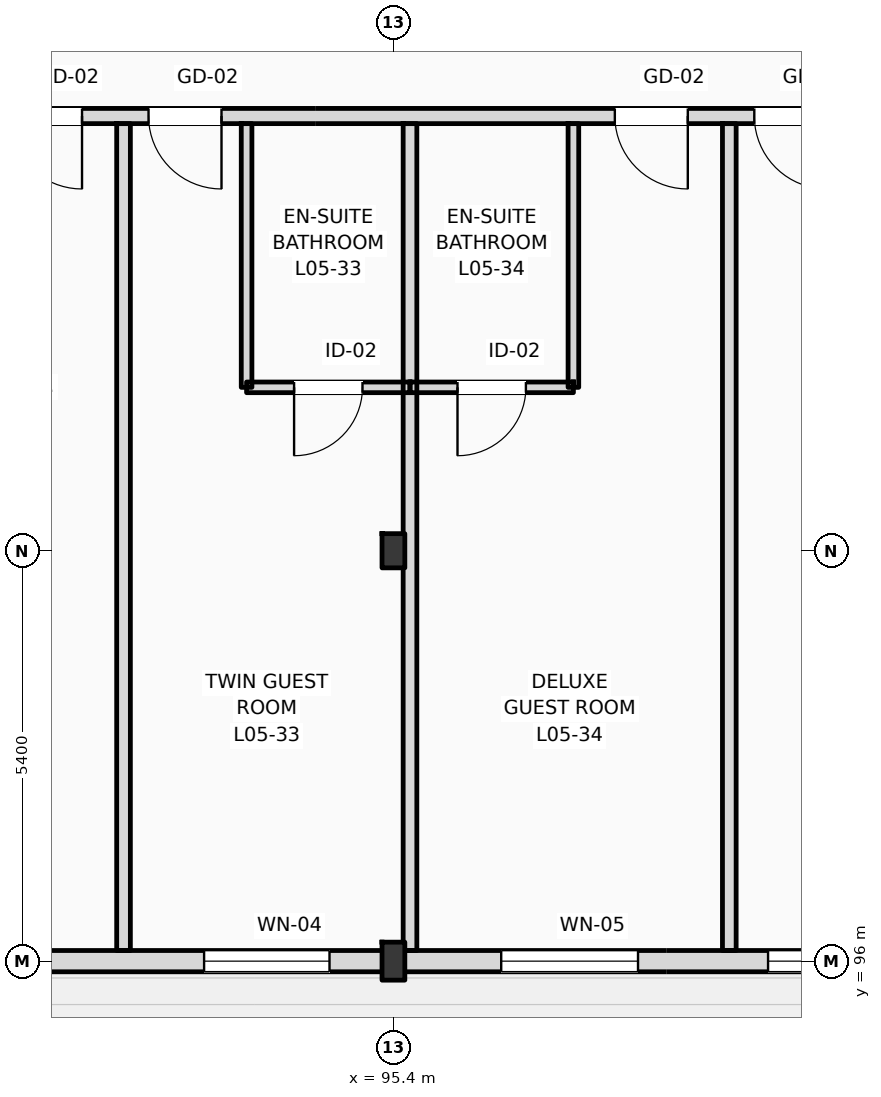
"""IFC4 building model, lengths in metres.
Left out: names, types, materials, properties, quantities, classifications, styles, units other than length and angle.
Written with IfcOpenShell. Run it as: python <this file> out.ifc"""

import sys

from ifc_helpers import new_model, si_unit, direction, frame, frame_2d, origin, origin_2d, place, context, subcontext, project, spatial, rectangle, i_section, extrude, element, fill, save


model = new_model("IFC4")
c1 = context("Model", 3, precision=1e-05, world=origin(), true_north=direction((0.0, 1.0)))
c2 = subcontext(c1, "Body", "Model", "MODEL_VIEW")
j1 = project(units=[si_unit("LENGTHUNIT", "METRE"), si_unit("PLANEANGLEUNIT", "RADIAN")], contexts=[c1])
p1 = place(None, origin())
s1 = spatial("IfcSite", under=j1, at=p1, CompositionType="ELEMENT")
p2 = place(p1, origin())
s2 = spatial("IfcBuilding", under=s1, at=p2, CompositionType="ELEMENT")
p3 = place(p2, frame((0.0, 0.0, 24.6)))
s3 = spatial("IfcBuildingStorey", under=s2, at=p3, CompositionType="ELEMENT", Elevation=24.6)
p4 = place(p3, frame((95.4, 96.0, 0.0), z_axis=(0.0, 0.0, 1.0), x_axis=(1.0, 0.0, 0.0)))
e1 = element("IfcColumn", 1, at=p4, inside=s3, PredefinedType="COLUMN", context=c2, shape_type="SweptSolid", body=[
    extrude(i_section(OverallWidth=0.3, OverallDepth=0.5, WebThickness=0.014, FlangeThickness=0.028, FilletRadius=0.027, at=origin_2d()), origin(), (0.0, 0.0, 1.0), 3.6),
])
p5 = place(p3, frame((95.4, 101.4, 0.0), z_axis=(0.0, 0.0, 1.0), x_axis=(1.0, 0.0, 0.0)))
e2 = element("IfcColumn", 2, at=p5, inside=s3, PredefinedType="COLUMN", context=c2, shape_type="SweptSolid", body=[
    extrude(i_section(OverallWidth=0.3, OverallDepth=0.45, WebThickness=0.014, FlangeThickness=0.026, FilletRadius=0.027, at=origin_2d()), origin(), (0.0, 0.0, 1.0), 3.6),
])
p6 = place(p3, frame((25.2, 96.0, 0.0), z_axis=(0.0, 0.0, 1.0), x_axis=(1.0, 0.0, 0.0)))
e3 = element("IfcWall", 3, at=p6, inside=s3, PredefinedType="STANDARD", context=c2, shape_type="SweptSolid", body=[
    extrude(rectangle(XDim=94.8, YDim=0.28, at=frame_2d((47.4, 0.0))), origin(), (0.0, 0.0, 1.0), 2.78),
])
p7 = place(p6, frame((16.539, 0.0, 0.9)))
e4 = element("IfcOpeningElement", 4, at=p7, cuts=e3, PredefinedType="OPENING", context=c2, shape_type="SweptSolid", body=[
    extrude(rectangle(XDim=1.75, YDim=1.7, at=frame_2d((0.875, 0.85))), frame((0.0, 0.15, 0.0), z_axis=(0.0, -1.0, 0.0), x_axis=(1.0, 0.0, 0.0)), (0.0, 0.0, 1.0), 0.3),
])
p8 = place(p6, frame((20.367, 0.0, 0.9)))
e5 = element("IfcOpeningElement", 5, at=p8, cuts=e3, PredefinedType="OPENING", context=c2, shape_type="SweptSolid", body=[
    extrude(rectangle(XDim=2.0, YDim=1.7, at=frame_2d((1.0, 0.85))), frame((0.0, 0.15, 0.0), z_axis=(0.0, -1.0, 0.0), x_axis=(1.0, 0.0, 0.0)), (0.0, 0.0, 1.0), 0.3),
])
p9 = place(p6, frame((24.326, 0.0, 0.9)))
e6 = element("IfcOpeningElement", 6, at=p9, cuts=e3, PredefinedType="OPENING", context=c2, shape_type="SweptSolid", body=[
    extrude(rectangle(XDim=2.3, YDim=1.7, at=frame_2d((1.15, 0.85))), frame((0.0, 0.15, 0.0), z_axis=(0.0, -1.0, 0.0), x_axis=(1.0, 0.0, 0.0)), (0.0, 0.0, 1.0), 0.3),
])
p10 = place(p6, frame((27.684, 0.0, 0.9)))
e7 = element("IfcOpeningElement", 7, at=p10, cuts=e3, PredefinedType="OPENING", context=c2, shape_type="SweptSolid", body=[
    extrude(rectangle(XDim=2.6, YDim=1.7, at=frame_2d((1.3, 0.85))), frame((0.0, 0.15, 0.0), z_axis=(0.0, -1.0, 0.0), x_axis=(1.0, 0.0, 0.0)), (0.0, 0.0, 1.0), 0.3),
])
p11 = place(p6, frame((32.083, 0.0, 0.9)))
e8 = element("IfcOpeningElement", 8, at=p11, cuts=e3, PredefinedType="OPENING", context=c2, shape_type="SweptSolid", body=[
    extrude(rectangle(XDim=2.419, YDim=1.7, at=frame_2d((1.209, 0.85))), frame((0.0, 0.15, 0.0), z_axis=(0.0, -1.0, 0.0), x_axis=(1.0, 0.0, 0.0)), (0.0, 0.0, 1.0), 0.3),
])
p12 = place(p6, frame((35.322, 0.0, 0.9)))
e9 = element("IfcOpeningElement", 9, at=p12, cuts=e3, PredefinedType="OPENING", context=c2, shape_type="SweptSolid", body=[
    extrude(rectangle(XDim=2.868, YDim=1.7, at=frame_2d((1.434, 0.85))), frame((0.0, 0.15, 0.0), z_axis=(0.0, -1.0, 0.0), x_axis=(1.0, 0.0, 0.0)), (0.0, 0.0, 1.0), 0.3),
])
p13 = place(p6, frame((56.015, 0.0, 0.9)))
e10 = element("IfcOpeningElement", 10, at=p13, cuts=e3, PredefinedType="OPENING", context=c2, shape_type="SweptSolid", body=[
    extrude(rectangle(XDim=1.2, YDim=1.7, at=frame_2d((0.6, 0.85))), frame((0.0, 0.15, 0.0), z_axis=(0.0, -1.0, 0.0), x_axis=(1.0, 0.0, 0.0)), (0.0, 0.0, 1.0), 0.3),
])
p14 = place(p6, frame((59.888, 0.0, 0.9)))
e11 = element("IfcOpeningElement", 11, at=p14, cuts=e3, PredefinedType="OPENING", context=c2, shape_type="SweptSolid", body=[
    extrude(rectangle(XDim=1.35, YDim=1.7, at=frame_2d((0.675, 0.85))), frame((0.0, 0.15, 0.0), z_axis=(0.0, -1.0, 0.0), x_axis=(1.0, 0.0, 0.0)), (0.0, 0.0, 1.0), 0.3),
])
p15 = place(p6, frame((63.799, 0.0, 0.9)))
e12 = element("IfcOpeningElement", 12, at=p15, cuts=e3, PredefinedType="OPENING", context=c2, shape_type="SweptSolid", body=[
    extrude(rectangle(XDim=1.5, YDim=1.7, at=frame_2d((0.75, 0.85))), frame((0.0, 0.15, 0.0), z_axis=(0.0, -1.0, 0.0), x_axis=(1.0, 0.0, 0.0)), (0.0, 0.0, 1.0), 0.3),
])
p16 = place(p6, frame((67.709, 0.0, 0.9)))
e13 = element("IfcOpeningElement", 13, at=p16, cuts=e3, PredefinedType="OPENING", context=c2, shape_type="SweptSolid", body=[
    extrude(rectangle(XDim=1.65, YDim=1.7, at=frame_2d((0.825, 0.85))), frame((0.0, 0.15, 0.0), z_axis=(0.0, -1.0, 0.0), x_axis=(1.0, 0.0, 0.0)), (0.0, 0.0, 1.0), 0.3),
])
p17 = place(p6, frame((71.618, 0.0, 0.9)))
e14 = element("IfcOpeningElement", 14, at=p17, cuts=e3, PredefinedType="OPENING", context=c2, shape_type="SweptSolid", body=[
    extrude(rectangle(XDim=1.8, YDim=1.7, at=frame_2d((0.9, 0.85))), frame((0.0, 0.15, 0.0), z_axis=(0.0, -1.0, 0.0), x_axis=(1.0, 0.0, 0.0)), (0.0, 0.0, 1.0), 0.3),
])
p18 = place(p6, frame((75.129, 0.0, 0.9)))
e15 = element("IfcOpeningElement", 15, at=p18, cuts=e3, PredefinedType="OPENING", context=c2, shape_type="SweptSolid", body=[
    extrude(rectangle(XDim=1.95, YDim=1.7, at=frame_2d((0.975, 0.85))), frame((0.0, 0.15, 0.0), z_axis=(0.0, -1.0, 0.0), x_axis=(1.0, 0.0, 0.0)), (0.0, 0.0, 1.0), 0.3),
])
p19 = place(p6, frame((79.439, 0.0, 0.9)))
e16 = element("IfcOpeningElement", 16, at=p19, cuts=e3, PredefinedType="OPENING", context=c2, shape_type="SweptSolid", body=[
    extrude(rectangle(XDim=2.1, YDim=1.7, at=frame_2d((1.05, 0.85))), frame((0.0, 0.15, 0.0), z_axis=(0.0, -1.0, 0.0), x_axis=(1.0, 0.0, 0.0)), (0.0, 0.0, 1.0), 0.3),
])
p20 = place(p6, frame((83.349, 0.0, 0.9)))
e17 = element("IfcOpeningElement", 17, at=p20, cuts=e3, PredefinedType="OPENING", context=c2, shape_type="SweptSolid", body=[
    extrude(rectangle(XDim=2.25, YDim=1.7, at=frame_2d((1.125, 0.85))), frame((0.0, 0.15, 0.0), z_axis=(0.0, -1.0, 0.0), x_axis=(1.0, 0.0, 0.0)), (0.0, 0.0, 1.0), 0.3),
])
p21 = place(p6, frame((87.258, 0.0, 0.9)))
e18 = element("IfcOpeningElement", 18, at=p21, cuts=e3, PredefinedType="OPENING", context=c2, shape_type="SweptSolid", body=[
    extrude(rectangle(XDim=2.4, YDim=1.7, at=frame_2d((1.2, 0.85))), frame((0.0, 0.15, 0.0), z_axis=(0.0, -1.0, 0.0), x_axis=(1.0, 0.0, 0.0)), (0.0, 0.0, 1.0), 0.3),
])
p22 = place(p6, frame((91.204, 0.0, 0.9)))
e19 = element("IfcOpeningElement", 19, at=p22, cuts=e3, PredefinedType="OPENING", context=c2, shape_type="SweptSolid", body=[
    extrude(rectangle(XDim=2.55, YDim=1.7, at=frame_2d((1.275, 0.85))), frame((0.0, 0.15, 0.0), z_axis=(0.0, -1.0, 0.0), x_axis=(1.0, 0.0, 0.0)), (0.0, 0.0, 1.0), 0.3),
])
p23 = place(p3, frame((79.76, 107.12, 0.0), z_axis=(0.0, 0.0, 1.0), x_axis=(1.0, 0.0, 0.0)))
e20 = element("IfcWall", 20, at=p23, inside=s3, PredefinedType="PARTITIONING", context=c2, shape_type="SweptSolid", body=[
    extrude(rectangle(XDim=40.1, YDim=0.2, at=frame_2d((20.05, 0.0))), origin(), (0.0, 0.0, 1.0), 3.34),
])
p24 = place(p23, frame((2.65, 0.0, 0.0)))
e21 = element("IfcOpeningElement", 21, at=p24, cuts=e20, PredefinedType="OPENING", context=c2, shape_type="SweptSolid", body=[
    extrude(rectangle(XDim=0.96, YDim=2.2, at=frame_2d((0.48, 1.1))), frame((0.0, 0.11, 0.0), z_axis=(0.0, -1.0, 0.0), x_axis=(1.0, 0.0, 0.0)), (0.0, 0.0, 1.0), 0.22),
])
p25 = place(p23, frame((4.448, 0.0, 0.0)))
e22 = element("IfcOpeningElement", 22, at=p25, cuts=e20, PredefinedType="OPENING", context=c2, shape_type="SweptSolid", body=[
    extrude(rectangle(XDim=0.96, YDim=2.2, at=frame_2d((0.48, 1.1))), frame((0.0, 0.11, 0.0), z_axis=(0.0, -1.0, 0.0), x_axis=(1.0, 0.0, 0.0)), (0.0, 0.0, 1.0), 0.22),
])
p26 = place(p23, frame((10.583, 0.0, 0.0)))
e23 = element("IfcOpeningElement", 23, at=p26, cuts=e20, PredefinedType="OPENING", context=c2, shape_type="SweptSolid", body=[
    extrude(rectangle(XDim=0.96, YDim=2.2, at=frame_2d((0.48, 1.1))), frame((0.0, 0.11, 0.0), z_axis=(0.0, -1.0, 0.0), x_axis=(1.0, 0.0, 0.0)), (0.0, 0.0, 1.0), 0.22),
])
p27 = place(p23, frame((12.418, 0.0, 0.0)))
e24 = element("IfcOpeningElement", 24, at=p27, cuts=e20, PredefinedType="OPENING", context=c2, shape_type="SweptSolid", body=[
    extrude(rectangle(XDim=0.96, YDim=2.2, at=frame_2d((0.48, 1.1))), frame((0.0, 0.11, 0.0), z_axis=(0.0, -1.0, 0.0), x_axis=(1.0, 0.0, 0.0)), (0.0, 0.0, 1.0), 0.22),
])
p28 = place(p23, frame((18.553, 0.0, 0.0)))
e25 = element("IfcOpeningElement", 25, at=p28, cuts=e20, PredefinedType="OPENING", context=c2, shape_type="SweptSolid", body=[
    extrude(rectangle(XDim=0.96, YDim=2.2, at=frame_2d((0.48, 1.1))), frame((0.0, 0.11, 0.0), z_axis=(0.0, -1.0, 0.0), x_axis=(1.0, 0.0, 0.0)), (0.0, 0.0, 1.0), 0.22),
])
p29 = place(p23, frame((20.388, 0.0, 0.0)))
e26 = element("IfcOpeningElement", 26, at=p29, cuts=e20, PredefinedType="OPENING", context=c2, shape_type="SweptSolid", body=[
    extrude(rectangle(XDim=0.96, YDim=2.2, at=frame_2d((0.48, 1.1))), frame((0.0, 0.11, 0.0), z_axis=(0.0, -1.0, 0.0), x_axis=(1.0, 0.0, 0.0)), (0.0, 0.0, 1.0), 0.22),
])
p30 = place(p23, frame((26.523, 0.0, 0.0)))
e27 = element("IfcOpeningElement", 27, at=p30, cuts=e20, PredefinedType="OPENING", context=c2, shape_type="SweptSolid", body=[
    extrude(rectangle(XDim=0.96, YDim=2.2, at=frame_2d((0.48, 1.1))), frame((0.0, 0.11, 0.0), z_axis=(0.0, -1.0, 0.0), x_axis=(1.0, 0.0, 0.0)), (0.0, 0.0, 1.0), 0.22),
])
p31 = place(p23, frame((28.358, 0.0, 0.0)))
e28 = element("IfcOpeningElement", 28, at=p31, cuts=e20, PredefinedType="OPENING", context=c2, shape_type="SweptSolid", body=[
    extrude(rectangle(XDim=0.96, YDim=2.2, at=frame_2d((0.48, 1.1))), frame((0.0, 0.11, 0.0), z_axis=(0.0, -1.0, 0.0), x_axis=(1.0, 0.0, 0.0)), (0.0, 0.0, 1.0), 0.22),
])
p32 = place(p23, frame((34.493, 0.0, 0.0)))
e29 = element("IfcOpeningElement", 29, at=p32, cuts=e20, PredefinedType="OPENING", context=c2, shape_type="SweptSolid", body=[
    extrude(rectangle(XDim=0.96, YDim=2.2, at=frame_2d((0.48, 1.1))), frame((0.0, 0.11, 0.0), z_axis=(0.0, -1.0, 0.0), x_axis=(1.0, 0.0, 0.0)), (0.0, 0.0, 1.0), 0.22),
])
p33 = place(p23, frame((36.364, 0.0, 0.0)))
e30 = element("IfcOpeningElement", 30, at=p33, cuts=e20, PredefinedType="OPENING", context=c2, shape_type="SweptSolid", body=[
    extrude(rectangle(XDim=0.96, YDim=2.2, at=frame_2d((0.48, 1.1))), frame((0.0, 0.11, 0.0), z_axis=(0.0, -1.0, 0.0), x_axis=(1.0, 0.0, 0.0)), (0.0, 0.0, 1.0), 0.22),
])
p34 = place(p3, frame((91.849, 96.14, 0.0), z_axis=(0.0, 0.0, 1.0), x_axis=(0.0, 1.0, 0.0)))
e31 = element("IfcWall", 31, at=p34, inside=s3, PredefinedType="PARTITIONING", context=c2, shape_type="SweptSolid", body=[
    extrude(rectangle(XDim=10.88, YDim=0.18, at=frame_2d((5.44, 0.0))), origin(), (0.0, 0.0, 1.0), 3.34),
])
p35 = place(p3, frame((95.618, 96.14, 0.0), z_axis=(0.0, 0.0, 1.0), x_axis=(0.0, 1.0, 0.0)))
e32 = element("IfcWall", 32, at=p35, inside=s3, PredefinedType="PARTITIONING", context=c2, shape_type="SweptSolid", body=[
    extrude(rectangle(XDim=10.88, YDim=0.18, at=frame_2d((5.44, 0.0))), origin(), (0.0, 0.0, 1.0), 2.93),
])
p36 = place(p3, frame((93.468, 103.55, 0.0), z_axis=(0.0, 0.0, 1.0), x_axis=(0.0, 1.0, 0.0)))
e33 = element("IfcWall", 33, at=p36, inside=s3, PredefinedType="PARTITIONING", context=c2, shape_type="SweptSolid", body=[
    extrude(rectangle(XDim=3.47, YDim=0.14, at=frame_2d((1.735, 0.0))), origin(), (0.0, 0.0, 1.0), 3.34),
])
p37 = place(p3, frame((93.468, 103.55, 0.0), z_axis=(0.0, 0.0, 1.0), x_axis=(1.0, 0.0, 0.0)))
e34 = element("IfcWall", 34, at=p37, inside=s3, PredefinedType="PARTITIONING", context=c2, shape_type="SweptSolid", body=[
    extrude(rectangle(XDim=2.15, YDim=0.14, at=frame_2d((1.075, 0.0))), origin(), (0.0, 0.0, 1.0), 3.34),
])
p38 = place(p37, frame((0.625, 0.0, 0.0)))
e35 = element("IfcOpeningElement", 35, at=p38, cuts=e34, PredefinedType="OPENING", context=c2, shape_type="SweptSolid", body=[
    extrude(rectangle(XDim=0.9, YDim=2.1, at=frame_2d((0.45, 1.05))), frame((0.0, 0.08, 0.0), z_axis=(0.0, -1.0, 0.0), x_axis=(1.0, 0.0, 0.0)), (0.0, 0.0, 1.0), 0.16),
])
p39 = place(p3, frame((99.819, 96.14, 0.0), z_axis=(0.0, 0.0, 1.0), x_axis=(0.0, 1.0, 0.0)))
e36 = element("IfcWall", 36, at=p39, inside=s3, PredefinedType="PARTITIONING", context=c2, shape_type="SweptSolid", body=[
    extrude(rectangle(XDim=10.88, YDim=0.18, at=frame_2d((5.44, 0.0))), origin(), (0.0, 0.0, 1.0), 3.34),
])
p40 = place(p3, frame((97.768, 103.55, 0.0), z_axis=(0.0, 0.0, 1.0), x_axis=(0.0, 1.0, 0.0)))
e37 = element("IfcWall", 37, at=p40, inside=s3, PredefinedType="PARTITIONING", context=c2, shape_type="SweptSolid", body=[
    extrude(rectangle(XDim=3.47, YDim=0.14, at=frame_2d((1.735, 0.0))), origin(), (0.0, 0.0, 1.0), 3.34),
])
p41 = place(p3, frame((95.618, 103.55, 0.0), z_axis=(0.0, 0.0, 1.0), x_axis=(1.0, 0.0, 0.0)))
e38 = element("IfcWall", 38, at=p41, inside=s3, PredefinedType="PARTITIONING", context=c2, shape_type="SweptSolid", body=[
    extrude(rectangle(XDim=2.15, YDim=0.14, at=frame_2d((1.075, 0.0))), origin(), (0.0, 0.0, 1.0), 3.34),
])
p42 = place(p41, frame((0.625, 0.0, 0.0)))
e39 = element("IfcOpeningElement", 39, at=p42, cuts=e38, PredefinedType="OPENING", context=c2, shape_type="SweptSolid", body=[
    extrude(rectangle(XDim=0.9, YDim=2.1, at=frame_2d((0.45, 1.05))), frame((0.0, 0.08, 0.0), z_axis=(0.0, -1.0, 0.0), x_axis=(1.0, 0.0, 0.0)), (0.0, 0.0, 1.0), 0.16),
])
p43 = place(p16, origin())
e40 = element("IfcWindow", 40, at=p43, inside=s3, PartitioningType="DOUBLE_PANEL_VERTICAL", PredefinedType="WINDOW", context=c2, shape_type="SweptSolid", body=[
    extrude(rectangle(XDim=1.65, YDim=1.7, at=frame_2d((0.825, 0.85))), frame((0.0, 0.03, 0.0), z_axis=(0.0, -1.0, 0.0), x_axis=(1.0, 0.0, 0.0)), (0.0, 0.0, 1.0), 0.06),
])
fill(e13, e40)
p44 = place(p17, origin())
e41 = element("IfcWindow", 41, at=p44, inside=s3, PartitioningType="DOUBLE_PANEL_VERTICAL", PredefinedType="WINDOW", context=c2, shape_type="SweptSolid", body=[
    extrude(rectangle(XDim=1.8, YDim=1.7, at=frame_2d((0.9, 0.85))), frame((0.0, 0.03, 0.0), z_axis=(0.0, -1.0, 0.0), x_axis=(1.0, 0.0, 0.0)), (0.0, 0.0, 1.0), 0.06),
])
fill(e14, e41)
p45 = place(p18, origin())
e42 = element("IfcWindow", 42, at=p45, inside=s3, PartitioningType="DOUBLE_PANEL_VERTICAL", PredefinedType="WINDOW", context=c2, shape_type="SweptSolid", body=[
    extrude(rectangle(XDim=1.95, YDim=1.7, at=frame_2d((0.975, 0.85))), frame((0.0, 0.03, 0.0), z_axis=(0.0, -1.0, 0.0), x_axis=(1.0, 0.0, 0.0)), (0.0, 0.0, 1.0), 0.06),
])
fill(e15, e42)
p46 = place(p26, frame((0.96, 0.0, 0.0), z_axis=(0.0, 0.0, 1.0), x_axis=(-1.0, 0.0, 0.0)))
e43 = element("IfcDoor", 43, at=p46, inside=s3, OperationType="SINGLE_SWING_RIGHT", PredefinedType="DOOR", context=c2, shape_type="SweptSolid", body=[
    extrude(rectangle(XDim=0.96, YDim=2.2, at=frame_2d((0.48, 1.1))), frame((0.0, 0.025, 0.0), z_axis=(0.0, -1.0, 0.0), x_axis=(1.0, 0.0, 0.0)), (0.0, 0.0, 1.0), 0.05),
])
fill(e23, e43)
p47 = place(p27, frame((0.96, 0.0, 0.0), z_axis=(0.0, 0.0, 1.0), x_axis=(-1.0, 0.0, 0.0)))
e44 = element("IfcDoor", 44, at=p47, inside=s3, OperationType="SINGLE_SWING_RIGHT", PredefinedType="DOOR", context=c2, shape_type="SweptSolid", body=[
    extrude(rectangle(XDim=0.96, YDim=2.2, at=frame_2d((0.48, 1.1))), frame((0.0, 0.025, 0.0), z_axis=(0.0, -1.0, 0.0), x_axis=(1.0, 0.0, 0.0)), (0.0, 0.0, 1.0), 0.05),
])
fill(e24, e44)
p48 = place(p38, frame((0.9, 0.0, 0.0), z_axis=(0.0, 0.0, 1.0), x_axis=(-1.0, 0.0, 0.0)))
e45 = element("IfcDoor", 45, at=p48, inside=s3, OperationType="SINGLE_SWING_LEFT", PredefinedType="DOOR", context=c2, shape_type="SweptSolid", body=[
    extrude(rectangle(XDim=0.9, YDim=2.1, at=frame_2d((0.45, 1.05))), frame((0.0, 0.025, 0.0), z_axis=(0.0, -1.0, 0.0), x_axis=(1.0, 0.0, 0.0)), (0.0, 0.0, 1.0), 0.05),
])
fill(e35, e45)
p49 = place(p28, frame((0.96, 0.0, 0.0), z_axis=(0.0, 0.0, 1.0), x_axis=(-1.0, 0.0, 0.0)))
e46 = element("IfcDoor", 46, at=p49, inside=s3, OperationType="SINGLE_SWING_RIGHT", PredefinedType="DOOR", context=c2, shape_type="SweptSolid", body=[
    extrude(rectangle(XDim=0.96, YDim=2.2, at=frame_2d((0.48, 1.1))), frame((0.0, 0.025, 0.0), z_axis=(0.0, -1.0, 0.0), x_axis=(1.0, 0.0, 0.0)), (0.0, 0.0, 1.0), 0.05),
])
fill(e25, e46)
p50 = place(p42, frame((0.9, 0.0, 0.0), z_axis=(0.0, 0.0, 1.0), x_axis=(-1.0, 0.0, 0.0)))
e47 = element("IfcDoor", 47, at=p50, inside=s3, OperationType="SINGLE_SWING_LEFT", PredefinedType="DOOR", context=c2, shape_type="SweptSolid", body=[
    extrude(rectangle(XDim=0.9, YDim=2.1, at=frame_2d((0.45, 1.05))), frame((0.0, 0.025, 0.0), z_axis=(0.0, -1.0, 0.0), x_axis=(1.0, 0.0, 0.0)), (0.0, 0.0, 1.0), 0.05),
])
fill(e39, e47)
p51 = place(p29, frame((0.96, 0.0, 0.0), z_axis=(0.0, 0.0, 1.0), x_axis=(-1.0, 0.0, 0.0)))
e48 = element("IfcDoor", 48, at=p51, inside=s3, OperationType="SINGLE_SWING_RIGHT", PredefinedType="DOOR", context=c2, shape_type="SweptSolid", body=[
    extrude(rectangle(XDim=0.96, YDim=2.2, at=frame_2d((0.48, 1.1))), frame((0.0, 0.025, 0.0), z_axis=(0.0, -1.0, 0.0), x_axis=(1.0, 0.0, 0.0)), (0.0, 0.0, 1.0), 0.05),
])
fill(e26, e48)
save(model, sys.argv[1])
